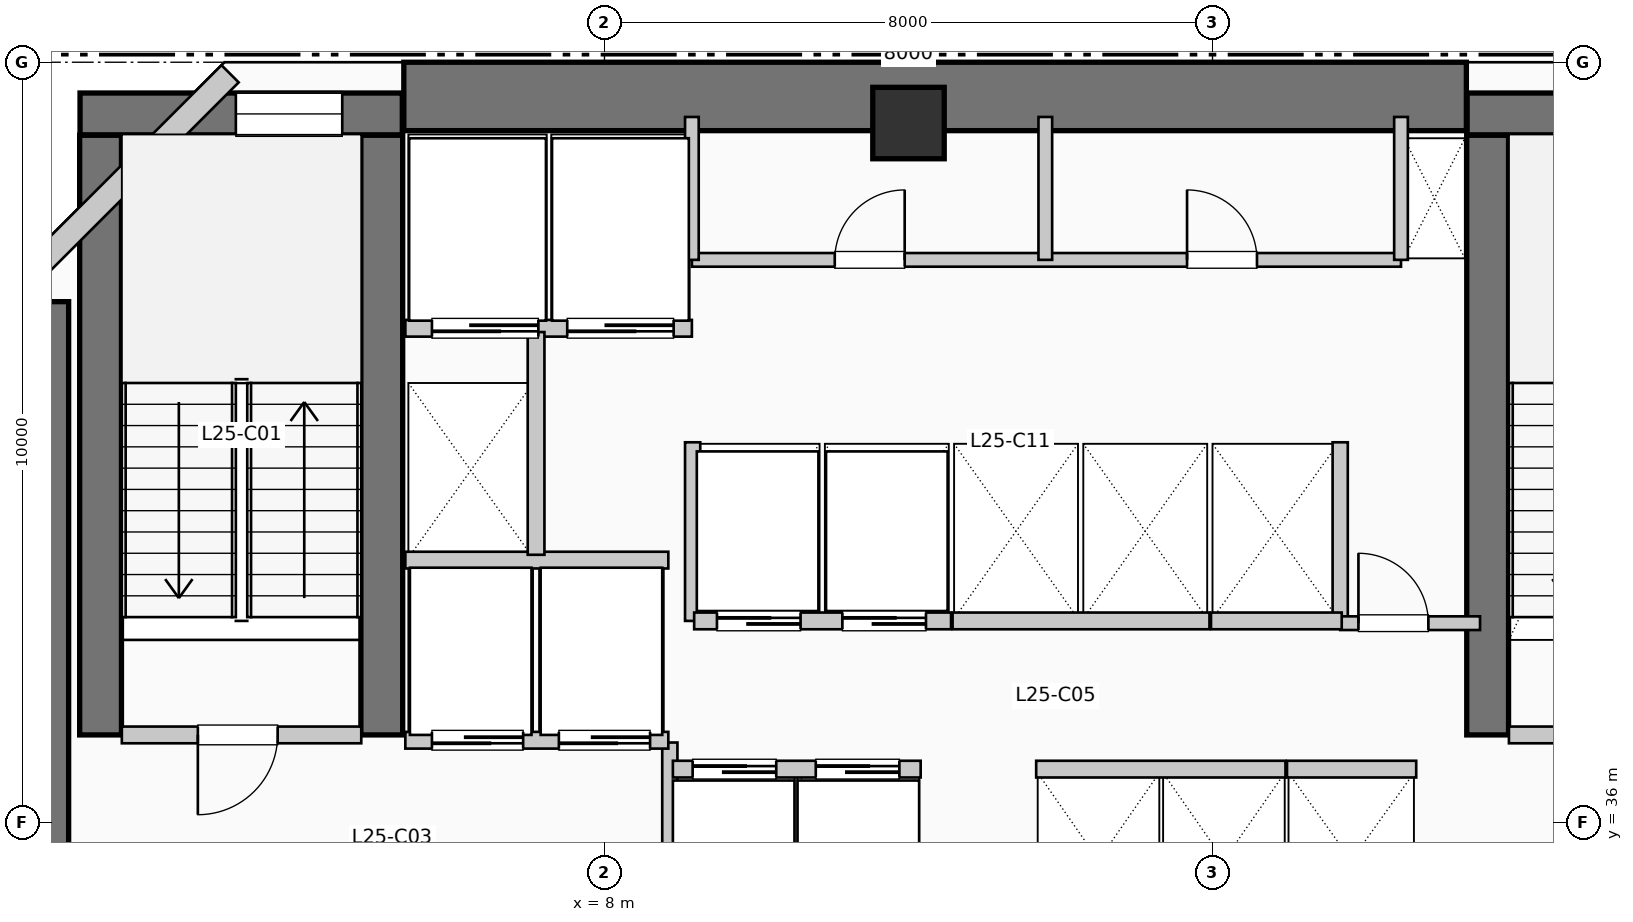
"""IFC4 building model, lengths in metres.
Left out: names, types, materials, properties, quantities, classifications, styles, units other than length and angle.
Written with IfcOpenShell. Run it as: python <this file> out.ifc"""

import sys

from ifc_helpers import new_model, si_unit, direction, frame, frame_2d, origin, origin_2d, place, context, subcontext, project, spatial, rectangle, extrude, element, fill, save


model = new_model("IFC4")
c1 = context("Model", 3, precision=1e-05, world=origin(), true_north=direction((0.0, 1.0)))
c2 = subcontext(c1, "Body", "Model", "MODEL_VIEW")
j1 = project(units=[si_unit("LENGTHUNIT", "METRE"), si_unit("PLANEANGLEUNIT", "RADIAN")], contexts=[c1])
p1 = place(None, origin())
s1 = spatial("IfcSite", under=j1, at=p1, CompositionType="ELEMENT")
p2 = place(p1, origin())
s2 = spatial("IfcBuilding", under=s1, at=p2, CompositionType="ELEMENT")
p3 = place(p2, frame((0.0, 0.0, 106.59)))
s3 = spatial("IfcBuildingStorey", under=s2, at=p3, CompositionType="ELEMENT", Elevation=106.59)
p4 = place(p3, frame((5.36, 45.55, 0.0), z_axis=(0.0, 0.0, 1.0), x_axis=(1.0, 0.0, 0.0)))
e1 = element("IfcWall", 1, at=p4, inside=s3, PredefinedType="SHEAR", context=c2, shape_type="SweptSolid", body=[
    extrude(rectangle(XDim=13.98, YDim=0.9, at=frame_2d((6.99, 0.0))), origin(), (0.0, 0.0, 1.0), 3.96),
])
p5 = place(p3, frame((0.5, 34.95, 0.0), z_axis=(0.0, 0.0, 1.0), x_axis=(0.0, 1.0, 0.0)))
e2 = element("IfcWall", 2, at=p5, inside=s3, PredefinedType="SHEAR", context=c2, shape_type="SweptSolid", body=[
    extrude(rectangle(XDim=7.9, YDim=0.9, at=frame_2d((3.95, 0.0))), origin(), (0.0, 0.0, 1.0), 3.96),
])
for number, where, z_axis, x_axis in (
    (3, (1.37, 37.15, 0.0), (0.0, 0.0, 1.0), (0.0, 1.0, 0.0)),
    (4, (5.07, 37.15, 0.0), (0.0, 0.0, 1.0), (0.0, 1.0, 0.0)),
):
    element("IfcWall", number, at=place(p3, frame(where, z_axis=z_axis, x_axis=x_axis)), inside=s3, PredefinedType="SHEAR", context=c2, shape_type="SweptSolid", body=[
        extrude(rectangle(XDim=7.89, YDim=0.55, at=frame_2d((3.945, 0.0))), origin(), (0.0, 0.0, 1.0), 3.96),
    ])
p6 = place(p3, frame((1.1, 45.32, 0.0), z_axis=(0.0, 0.0, 1.0), x_axis=(1.0, 0.0, 0.0)))
e5 = element("IfcWall", 5, at=p6, inside=s3, PredefinedType="SHEAR", context=c2, shape_type="SweptSolid", body=[
    extrude(rectangle(XDim=4.24, YDim=0.55, at=frame_2d((2.12, 0.0))), origin(), (0.0, 0.0, 1.0), 3.96),
])
p7 = place(p6, frame((2.05, 0.0, 1.05)))
e6 = element("IfcOpeningElement", 6, at=p7, cuts=e5, PredefinedType="OPENING", context=c2, shape_type="SweptSolid", body=[
    extrude(rectangle(XDim=1.4, YDim=1.8, at=frame_2d((0.7, 0.9))), frame((0.0, 0.285, 0.0), z_axis=(0.0, -1.0, 0.0), x_axis=(1.0, 0.0, 0.0)), (0.0, 0.0, 1.0), 0.57),
])
p8 = place(p3, frame((19.62, 37.15, 0.0), z_axis=(0.0, 0.0, 1.0), x_axis=(0.0, 1.0, 0.0)))
e7 = element("IfcWall", 7, at=p8, inside=s3, PredefinedType="SHEAR", context=c2, shape_type="SweptSolid", body=[
    extrude(rectangle(XDim=7.89, YDim=0.55, at=frame_2d((3.945, 0.0))), origin(), (0.0, 0.0, 1.0), 3.96),
])
p9 = place(p3, frame((19.35, 45.32, 0.0), z_axis=(0.0, 0.0, 1.0), x_axis=(1.0, 0.0, 0.0)))
e8 = element("IfcWall", 8, at=p9, inside=s3, PredefinedType="SHEAR", context=c2, shape_type="SweptSolid", body=[
    extrude(rectangle(XDim=3.69, YDim=0.55, at=frame_2d((1.845, 0.0))), origin(), (0.0, 0.0, 1.0), 3.96),
])
p10 = place(p9, frame((1.15, 0.0, 1.05)))
e9 = element("IfcOpeningElement", 9, at=p10, cuts=e8, PredefinedType="OPENING", context=c2, shape_type="SweptSolid", body=[
    extrude(rectangle(XDim=1.4, YDim=1.8, at=frame_2d((0.7, 0.9))), frame((0.0, 0.285, 0.0), z_axis=(0.0, -1.0, 0.0), x_axis=(1.0, 0.0, 0.0)), (0.0, 0.0, 1.0), 0.57),
])
p11 = place(p3, frame((12.0, 45.2, 0.0), z_axis=(0.0, 0.0, 1.0), x_axis=(1.0, 0.0, 0.0)))
e10 = element("IfcColumn", 10, at=p11, inside=s3, PredefinedType="COLUMN", context=c2, shape_type="SweptSolid", body=[
    extrude(rectangle(XDim=0.94, YDim=0.94, at=origin_2d()), origin(), (0.0, 0.0, 1.0), 3.96),
])
p12 = place(p3, frame((3.074, 45.848, 0.0), z_axis=(0.0, 0.0, 1.0), x_axis=(-0.707106781187, -0.707106781187, 0.0)))
e11 = element("IfcWall", 11, at=p12, inside=s3, PredefinedType="SOLIDWALL", context=c2, shape_type="SweptSolid", body=[
    extrude(rectangle(XDim=4.133, YDim=0.32, at=frame_2d((2.066, 0.0))), origin(), (0.0, 0.0, 1.0), 3.71),
])
p13 = place(p3, frame((1.65, 37.15, 0.0), z_axis=(0.0, 0.0, 1.0), x_axis=(1.0, 0.0, 0.0)))
e12 = element("IfcWall", 12, at=p13, inside=s3, PredefinedType="PARTITIONING", context=c2, shape_type="SweptSolid", body=[
    extrude(rectangle(XDim=3.15, YDim=0.22, at=frame_2d((1.575, 0.0))), origin(), (0.0, 0.0, 1.0), 3.71),
])
p14 = place(p13, frame((2.05, 0.0, 0.0), z_axis=(0.0, 0.0, 1.0), x_axis=(-1.0, 0.0, 0.0)))
e13 = element("IfcOpeningElement", 13, at=p14, cuts=e12, PredefinedType="OPENING", context=c2, shape_type="SweptSolid", body=[
    extrude(rectangle(XDim=1.05, YDim=2.15, at=frame_2d((0.525, 1.075))), frame((0.0, 0.12, 0.0), z_axis=(0.0, -1.0, 0.0), x_axis=(1.0, 0.0, 0.0)), (0.0, 0.0, 1.0), 0.24),
])
p15 = place(p3, frame((8.86, 34.55, 0.0), z_axis=(0.0, 0.0, 1.0), x_axis=(0.0, 1.0, 0.0)))
e14 = element("IfcWall", 14, at=p15, inside=s3, PredefinedType="PARTITIONING", context=c2, shape_type="SweptSolid", body=[
    extrude(rectangle(XDim=2.5, YDim=0.2, at=frame_2d((1.25, 0.0))), origin(), (0.0, 0.0, 1.0), 3.71),
])
p16 = place(p3, frame((19.9, 37.15, 0.0), z_axis=(0.0, 0.0, 1.0), x_axis=(1.0, 0.0, 0.0)))
e15 = element("IfcWall", 15, at=p16, inside=s3, PredefinedType="PARTITIONING", context=c2, shape_type="SweptSolid", body=[
    extrude(rectangle(XDim=3.15, YDim=0.22, at=frame_2d((1.575, 0.0))), origin(), (0.0, 0.0, 1.0), 3.71),
])
p17 = place(p16, frame((2.05, 0.0, 0.0), z_axis=(0.0, 0.0, 1.0), x_axis=(-1.0, 0.0, 0.0)))
e16 = element("IfcOpeningElement", 16, at=p17, cuts=e15, PredefinedType="OPENING", context=c2, shape_type="SweptSolid", body=[
    extrude(rectangle(XDim=1.05, YDim=2.15, at=frame_2d((0.525, 1.075))), frame((0.0, 0.12, 0.0), z_axis=(0.0, -1.0, 0.0), x_axis=(1.0, 0.0, 0.0)), (0.0, 0.0, 1.0), 0.24),
])
p18 = place(p3, frame((5.38, 37.08, 0.0), z_axis=(0.0, 0.0, 1.0), x_axis=(1.0, 0.0, 0.0)))
e17 = element("IfcWall", 17, at=p18, inside=s3, PredefinedType="PARTITIONING", context=c2, shape_type="SweptSolid", body=[
    extrude(rectangle(XDim=3.46, YDim=0.22, at=frame_2d((1.73, 0.0))), origin(), (0.0, 0.0, 1.0), 3.71),
])
p19 = place(p18, frame((1.55, 0.0, 0.0), z_axis=(0.0, 0.0, 1.0), x_axis=(-1.0, 0.0, 0.0)))
e18 = element("IfcOpeningElement", 18, at=p19, cuts=e17, PredefinedType="OPENING", context=c2, shape_type="SweptSolid", body=[
    extrude(rectangle(XDim=1.2, YDim=2.2, at=frame_2d((0.6, 1.1))), frame((0.0, 0.12, 0.0), z_axis=(0.0, -1.0, 0.0), x_axis=(1.0, 0.0, 0.0)), (0.0, 0.0, 1.0), 0.24),
])
p20 = place(p18, frame((3.22, 0.0, 0.0), z_axis=(0.0, 0.0, 1.0), x_axis=(-1.0, 0.0, 0.0)))
e19 = element("IfcOpeningElement", 19, at=p20, cuts=e17, PredefinedType="OPENING", context=c2, shape_type="SweptSolid", body=[
    extrude(rectangle(XDim=1.2, YDim=2.2, at=frame_2d((0.6, 1.1))), frame((0.0, 0.12, 0.0), z_axis=(0.0, -1.0, 0.0), x_axis=(1.0, 0.0, 0.0)), (0.0, 0.0, 1.0), 0.24),
])
p21 = place(p3, frame((5.38, 39.45, 0.0), z_axis=(0.0, 0.0, 1.0), x_axis=(1.0, 0.0, 0.0)))
e20 = element("IfcWall", 20, at=p21, inside=s3, PredefinedType="PARTITIONING", context=c2, shape_type="SweptSolid", body=[
    extrude(rectangle(XDim=3.46, YDim=0.22, at=frame_2d((1.73, 0.0))), origin(), (0.0, 0.0, 1.0), 3.71),
])
p22 = place(p3, frame((5.38, 42.5, 0.0), z_axis=(0.0, 0.0, 1.0), x_axis=(1.0, 0.0, 0.0)))
e21 = element("IfcWall", 21, at=p22, inside=s3, PredefinedType="PARTITIONING", context=c2, shape_type="SweptSolid", body=[
    extrude(rectangle(XDim=3.77, YDim=0.22, at=frame_2d((1.885, 0.0))), origin(), (0.0, 0.0, 1.0), 3.71),
])
p23 = place(p22, frame((1.75, 0.0, 0.0), z_axis=(0.0, 0.0, 1.0), x_axis=(-1.0, 0.0, 0.0)))
e22 = element("IfcOpeningElement", 22, at=p23, cuts=e21, PredefinedType="OPENING", context=c2, shape_type="SweptSolid", body=[
    extrude(rectangle(XDim=1.4, YDim=2.2, at=frame_2d((0.7, 1.1))), frame((0.0, 0.12, 0.0), z_axis=(0.0, -1.0, 0.0), x_axis=(1.0, 0.0, 0.0)), (0.0, 0.0, 1.0), 0.24),
])
p24 = place(p22, frame((3.53, 0.0, 0.0), z_axis=(0.0, 0.0, 1.0), x_axis=(-1.0, 0.0, 0.0)))
e23 = element("IfcOpeningElement", 23, at=p24, cuts=e21, PredefinedType="OPENING", context=c2, shape_type="SweptSolid", body=[
    extrude(rectangle(XDim=1.4, YDim=2.2, at=frame_2d((0.7, 1.1))), frame((0.0, 0.12, 0.0), z_axis=(0.0, -1.0, 0.0), x_axis=(1.0, 0.0, 0.0)), (0.0, 0.0, 1.0), 0.24),
])
p25 = place(p3, frame((7.1, 39.52, 0.0), z_axis=(0.0, 0.0, 1.0), x_axis=(0.0, 1.0, 0.0)))
e24 = element("IfcWall", 24, at=p25, inside=s3, PredefinedType="PARTITIONING", context=c2, shape_type="SweptSolid", body=[
    extrude(rectangle(XDim=2.93, YDim=0.22, at=frame_2d((1.465, 0.0))), origin(), (0.0, 0.0, 1.0), 3.71),
])
for number, where, z_axis, x_axis in (
    (25, (9.16, 38.65, 0.0), (0.0, 0.0, 1.0), (0.0, 1.0, 0.0)),
    (26, (17.68, 38.65, 0.0), (0.0, 0.0, 1.0), (0.0, 1.0, 0.0)),
):
    element("IfcWall", number, at=place(p3, frame(where, z_axis=z_axis, x_axis=x_axis)), inside=s3, PredefinedType="PARTITIONING", context=c2, shape_type="SweptSolid", body=[
        extrude(rectangle(XDim=2.35, YDim=0.2, at=frame_2d((1.175, 0.0))), origin(), (0.0, 0.0, 1.0), 3.71),
    ])
p26 = place(p3, frame((17.68, 38.62, 0.0), z_axis=(0.0, 0.0, 1.0), x_axis=(1.0, 0.0, 0.0)))
e27 = element("IfcWall", 27, at=p26, inside=s3, PredefinedType="PARTITIONING", context=c2, shape_type="SweptSolid", body=[
    extrude(rectangle(XDim=1.84, YDim=0.18, at=frame_2d((0.92, 0.0))), origin(), (0.0, 0.0, 1.0), 3.71),
])
p27 = place(p26, frame((0.24, 0.0, 0.0)))
e28 = element("IfcOpeningElement", 28, at=p27, cuts=e27, PredefinedType="OPENING", context=c2, shape_type="SweptSolid", body=[
    extrude(rectangle(XDim=0.92, YDim=2.1, at=frame_2d((0.46, 1.05))), frame((0.0, 0.1, 0.0), z_axis=(0.0, -1.0, 0.0), x_axis=(1.0, 0.0, 0.0)), (0.0, 0.0, 1.0), 0.2),
])
p28 = place(p3, frame((8.9, 36.7, 0.0), z_axis=(0.0, 0.0, 1.0), x_axis=(1.0, 0.0, 0.0)))
e29 = element("IfcWall", 29, at=p28, inside=s3, PredefinedType="PARTITIONING", context=c2, shape_type="SweptSolid", body=[
    extrude(rectangle(XDim=3.26, YDim=0.22, at=frame_2d((1.63, 0.0))), origin(), (0.0, 0.0, 1.0), 3.71),
])
p29 = place(p28, frame((0.26, 0.0, 0.0)))
e30 = element("IfcOpeningElement", 30, at=p29, cuts=e29, PredefinedType="OPENING", context=c2, shape_type="SweptSolid", body=[
    extrude(rectangle(XDim=1.1, YDim=2.2, at=frame_2d((0.55, 1.1))), frame((0.0, 0.12, 0.0), z_axis=(0.0, -1.0, 0.0), x_axis=(1.0, 0.0, 0.0)), (0.0, 0.0, 1.0), 0.24),
])
p30 = place(p28, frame((1.88, 0.0, 0.0)))
e31 = element("IfcOpeningElement", 31, at=p30, cuts=e29, PredefinedType="OPENING", context=c2, shape_type="SweptSolid", body=[
    extrude(rectangle(XDim=1.1, YDim=2.2, at=frame_2d((0.55, 1.1))), frame((0.0, 0.12, 0.0), z_axis=(0.0, -1.0, 0.0), x_axis=(1.0, 0.0, 0.0)), (0.0, 0.0, 1.0), 0.24),
])
p31 = place(p3, frame((9.18, 38.65, 0.0), z_axis=(0.0, 0.0, 1.0), x_axis=(1.0, 0.0, 0.0)))
e32 = element("IfcWall", 32, at=p31, inside=s3, PredefinedType="PARTITIONING", context=c2, shape_type="SweptSolid", body=[
    extrude(rectangle(XDim=3.38, YDim=0.22, at=frame_2d((1.69, 0.0))), origin(), (0.0, 0.0, 1.0), 3.71),
])
p32 = place(p31, frame((0.3, 0.0, 0.0)))
e33 = element("IfcOpeningElement", 33, at=p32, cuts=e32, PredefinedType="OPENING", context=c2, shape_type="SweptSolid", body=[
    extrude(rectangle(XDim=1.1, YDim=2.2, at=frame_2d((0.55, 1.1))), frame((0.0, 0.12, 0.0), z_axis=(0.0, -1.0, 0.0), x_axis=(1.0, 0.0, 0.0)), (0.0, 0.0, 1.0), 0.24),
])
p33 = place(p31, frame((1.95, 0.0, 0.0)))
e34 = element("IfcOpeningElement", 34, at=p33, cuts=e32, PredefinedType="OPENING", context=c2, shape_type="SweptSolid", body=[
    extrude(rectangle(XDim=1.1, YDim=2.2, at=frame_2d((0.55, 1.1))), frame((0.0, 0.12, 0.0), z_axis=(0.0, -1.0, 0.0), x_axis=(1.0, 0.0, 0.0)), (0.0, 0.0, 1.0), 0.24),
])
p34 = place(p3, frame((13.68, 36.7, 0.0), z_axis=(0.0, 0.0, 1.0), x_axis=(1.0, 0.0, 0.0)))
e35 = element("IfcWall", 35, at=p34, inside=s3, PredefinedType="PARTITIONING", context=c2, shape_type="SweptSolid", body=[
    extrude(rectangle(XDim=3.28, YDim=0.22, at=frame_2d((1.64, 0.0))), origin(), (0.0, 0.0, 1.0), 3.71),
])
p35 = place(p3, frame((12.58, 38.65, 0.0), z_axis=(0.0, 0.0, 1.0), x_axis=(1.0, 0.0, 0.0)))
e36 = element("IfcWall", 36, at=p35, inside=s3, PredefinedType="PARTITIONING", context=c2, shape_type="SweptSolid", body=[
    extrude(rectangle(XDim=3.38, YDim=0.22, at=frame_2d((1.69, 0.0))), origin(), (0.0, 0.0, 1.0), 3.71),
])
p36 = place(p3, frame((16.98, 36.7, 0.0), z_axis=(0.0, 0.0, 1.0), x_axis=(1.0, 0.0, 0.0)))
e37 = element("IfcWall", 37, at=p36, inside=s3, PredefinedType="PARTITIONING", context=c2, shape_type="SweptSolid", body=[
    extrude(rectangle(XDim=1.7, YDim=0.22, at=frame_2d((0.85, 0.0))), origin(), (0.0, 0.0, 1.0), 3.71),
])
p37 = place(p3, frame((15.98, 38.65, 0.0), z_axis=(0.0, 0.0, 1.0), x_axis=(1.0, 0.0, 0.0)))
e38 = element("IfcWall", 38, at=p37, inside=s3, PredefinedType="PARTITIONING", context=c2, shape_type="SweptSolid", body=[
    extrude(rectangle(XDim=1.72, YDim=0.22, at=frame_2d((0.86, 0.0))), origin(), (0.0, 0.0, 1.0), 3.71),
])
p38 = place(p3, frame((9.15, 43.4, 0.0), z_axis=(0.0, 0.0, 1.0), x_axis=(1.0, 0.0, 0.0)))
e39 = element("IfcWall", 39, at=p38, inside=s3, PredefinedType="PLUMBINGWALL", context=c2, shape_type="SweptSolid", body=[
    extrude(rectangle(XDim=9.33, YDim=0.18, at=frame_2d((4.665, 0.0))), origin(), (0.0, 0.0, 1.0), 3.71),
])
p39 = place(p38, frame((1.88, 0.0, 0.0)))
e40 = element("IfcOpeningElement", 40, at=p39, cuts=e39, PredefinedType="OPENING", context=c2, shape_type="SweptSolid", body=[
    extrude(rectangle(XDim=0.92, YDim=2.1, at=frame_2d((0.46, 1.05))), frame((0.0, 0.1, 0.0), z_axis=(0.0, -1.0, 0.0), x_axis=(1.0, 0.0, 0.0)), (0.0, 0.0, 1.0), 0.2),
])
p40 = place(p38, frame((6.515, 0.0, 0.0)))
e41 = element("IfcOpeningElement", 41, at=p40, cuts=e39, PredefinedType="OPENING", context=c2, shape_type="SweptSolid", body=[
    extrude(rectangle(XDim=0.92, YDim=2.1, at=frame_2d((0.46, 1.05))), frame((0.0, 0.1, 0.0), z_axis=(0.0, -1.0, 0.0), x_axis=(1.0, 0.0, 0.0)), (0.0, 0.0, 1.0), 0.2),
])
for number, where, z_axis, x_axis in (
    (42, (9.15, 43.4, 0.0), (0.0, 0.0, 1.0), (0.0, 1.0, 0.0)),
    (43, (18.48, 43.4, 0.0), (0.0, 0.0, 1.0), (0.0, 1.0, 0.0)),
    (44, (13.8, 43.4, 0.0), (0.0, 0.0, 1.0), (0.0, 1.0, 0.0)),
):
    element("IfcWall", number, at=place(p3, frame(where, z_axis=z_axis, x_axis=x_axis)), inside=s3, PredefinedType="PLUMBINGWALL", context=c2, shape_type="SweptSolid", body=[
        extrude(rectangle(XDim=1.88, YDim=0.18, at=frame_2d((0.94, 0.0))), origin(), (0.0, 0.0, 1.0), 3.71),
    ])
p41 = place(p7, origin())
e45 = element("IfcWindow", 45, at=p41, inside=s3, PartitioningType="SINGLE_PANEL", PredefinedType="WINDOW", context=c2, shape_type="SweptSolid", body=[
    extrude(rectangle(XDim=1.4, YDim=1.8, at=frame_2d((0.7, 0.9))), frame((0.0, 0.03, 0.0), z_axis=(0.0, -1.0, 0.0), x_axis=(1.0, 0.0, 0.0)), (0.0, 0.0, 1.0), 0.06),
])
fill(e6, e45)
p42 = place(p14, origin())
e46 = element("IfcDoor", 46, at=p42, inside=s3, OperationType="SINGLE_SWING_LEFT", PredefinedType="DOOR", context=c2, shape_type="SweptSolid", body=[
    extrude(rectangle(XDim=1.05, YDim=2.15, at=frame_2d((0.525, 1.075))), frame((0.0, 0.025, 0.0), z_axis=(0.0, -1.0, 0.0), x_axis=(1.0, 0.0, 0.0)), (0.0, 0.0, 1.0), 0.05),
])
fill(e13, e46)
p43 = place(p19, origin())
e47 = element("IfcDoor", 47, at=p43, inside=s3, OperationType="SLIDING_TO_RIGHT", PredefinedType="DOOR", context=c2, shape_type="SweptSolid", body=[
    extrude(rectangle(XDim=1.2, YDim=2.2, at=frame_2d((0.6, 1.1))), frame((0.0, 0.025, 0.0), z_axis=(0.0, -1.0, 0.0), x_axis=(1.0, 0.0, 0.0)), (0.0, 0.0, 1.0), 0.05),
])
fill(e18, e47)
p44 = place(p20, origin())
e48 = element("IfcDoor", 48, at=p44, inside=s3, OperationType="SLIDING_TO_RIGHT", PredefinedType="DOOR", context=c2, shape_type="SweptSolid", body=[
    extrude(rectangle(XDim=1.2, YDim=2.2, at=frame_2d((0.6, 1.1))), frame((0.0, 0.025, 0.0), z_axis=(0.0, -1.0, 0.0), x_axis=(1.0, 0.0, 0.0)), (0.0, 0.0, 1.0), 0.05),
])
fill(e19, e48)
p45 = place(p23, origin())
e49 = element("IfcDoor", 49, at=p45, inside=s3, OperationType="SLIDING_TO_LEFT", PredefinedType="DOOR", context=c2, shape_type="SweptSolid", body=[
    extrude(rectangle(XDim=1.4, YDim=2.2, at=frame_2d((0.7, 1.1))), frame((0.0, 0.025, 0.0), z_axis=(0.0, -1.0, 0.0), x_axis=(1.0, 0.0, 0.0)), (0.0, 0.0, 1.0), 0.05),
])
fill(e22, e49)
p46 = place(p24, origin())
e50 = element("IfcDoor", 50, at=p46, inside=s3, OperationType="SLIDING_TO_LEFT", PredefinedType="DOOR", context=c2, shape_type="SweptSolid", body=[
    extrude(rectangle(XDim=1.4, YDim=2.2, at=frame_2d((0.7, 1.1))), frame((0.0, 0.025, 0.0), z_axis=(0.0, -1.0, 0.0), x_axis=(1.0, 0.0, 0.0)), (0.0, 0.0, 1.0), 0.05),
])
fill(e23, e50)
p47 = place(p27, origin())
e51 = element("IfcDoor", 51, at=p47, inside=s3, OperationType="SINGLE_SWING_LEFT", PredefinedType="DOOR", context=c2, shape_type="SweptSolid", body=[
    extrude(rectangle(XDim=0.92, YDim=2.1, at=frame_2d((0.46, 1.05))), frame((0.0, 0.025, 0.0), z_axis=(0.0, -1.0, 0.0), x_axis=(1.0, 0.0, 0.0)), (0.0, 0.0, 1.0), 0.05),
])
fill(e28, e51)
p48 = place(p29, origin())
e52 = element("IfcDoor", 52, at=p48, inside=s3, OperationType="SLIDING_TO_LEFT", PredefinedType="DOOR", context=c2, shape_type="SweptSolid", body=[
    extrude(rectangle(XDim=1.1, YDim=2.2, at=frame_2d((0.55, 1.1))), frame((0.0, 0.025, 0.0), z_axis=(0.0, -1.0, 0.0), x_axis=(1.0, 0.0, 0.0)), (0.0, 0.0, 1.0), 0.05),
])
fill(e30, e52)
p49 = place(p30, origin())
e53 = element("IfcDoor", 53, at=p49, inside=s3, OperationType="SLIDING_TO_LEFT", PredefinedType="DOOR", context=c2, shape_type="SweptSolid", body=[
    extrude(rectangle(XDim=1.1, YDim=2.2, at=frame_2d((0.55, 1.1))), frame((0.0, 0.025, 0.0), z_axis=(0.0, -1.0, 0.0), x_axis=(1.0, 0.0, 0.0)), (0.0, 0.0, 1.0), 0.05),
])
fill(e31, e53)
p50 = place(p32, origin())
e54 = element("IfcDoor", 54, at=p50, inside=s3, OperationType="SLIDING_TO_LEFT", PredefinedType="DOOR", context=c2, shape_type="SweptSolid", body=[
    extrude(rectangle(XDim=1.1, YDim=2.2, at=frame_2d((0.55, 1.1))), frame((0.0, 0.025, 0.0), z_axis=(0.0, -1.0, 0.0), x_axis=(1.0, 0.0, 0.0)), (0.0, 0.0, 1.0), 0.05),
])
fill(e33, e54)
p51 = place(p33, origin())
e55 = element("IfcDoor", 55, at=p51, inside=s3, OperationType="SLIDING_TO_LEFT", PredefinedType="DOOR", context=c2, shape_type="SweptSolid", body=[
    extrude(rectangle(XDim=1.1, YDim=2.2, at=frame_2d((0.55, 1.1))), frame((0.0, 0.025, 0.0), z_axis=(0.0, -1.0, 0.0), x_axis=(1.0, 0.0, 0.0)), (0.0, 0.0, 1.0), 0.05),
])
fill(e34, e55)
p52 = place(p39, origin())
e56 = element("IfcDoor", 56, at=p52, inside=s3, OperationType="SINGLE_SWING_RIGHT", PredefinedType="DOOR", context=c2, shape_type="SweptSolid", body=[
    extrude(rectangle(XDim=0.92, YDim=2.1, at=frame_2d((0.46, 1.05))), frame((0.0, 0.025, 0.0), z_axis=(0.0, -1.0, 0.0), x_axis=(1.0, 0.0, 0.0)), (0.0, 0.0, 1.0), 0.05),
])
fill(e40, e56)
p53 = place(p40, origin())
e57 = element("IfcDoor", 57, at=p53, inside=s3, OperationType="SINGLE_SWING_LEFT", PredefinedType="DOOR", context=c2, shape_type="SweptSolid", body=[
    extrude(rectangle(XDim=0.92, YDim=2.1, at=frame_2d((0.46, 1.05))), frame((0.0, 0.025, 0.0), z_axis=(0.0, -1.0, 0.0), x_axis=(1.0, 0.0, 0.0)), (0.0, 0.0, 1.0), 0.05),
])
fill(e41, e57)
save(model, sys.argv[1])
